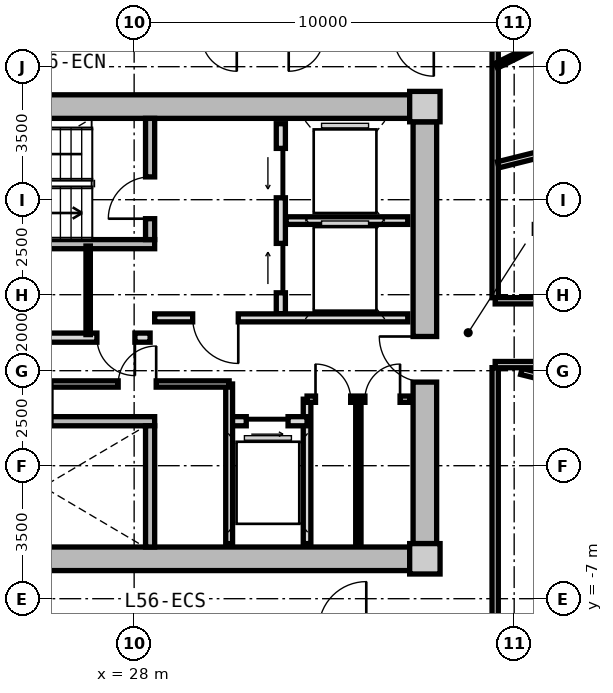
"""IFC4 building model, lengths in metres.
Left out: names, types, materials, properties, quantities, classifications, styles, units other than length and angle.
Written with IfcOpenShell. Run it as: python <this file> out.ifc"""

import sys

from ifc_helpers import new_model, si_unit, direction, frame, frame_2d, origin, origin_2d, place, context, subcontext, project, spatial, rectangle, extrude, source, transform, mapped, element, fill, save


model = new_model("IFC4")
c1 = context("Model", 3, precision=1e-05, world=origin(), true_north=direction((0.0, 1.0)))
c2 = subcontext(c1, "Body", "Model", "MODEL_VIEW")
j1 = project(units=[si_unit("LENGTHUNIT", "METRE"), si_unit("PLANEANGLEUNIT", "RADIAN")], contexts=[c1])
p1 = place(None, origin())
s1 = spatial("IfcSite", under=j1, at=p1, CompositionType="ELEMENT")
p2 = place(p1, origin())
s2 = spatial("IfcBuilding", under=s1, at=p2, CompositionType="ELEMENT")
p3 = place(p2, frame((0.0, 0.0, 180.05)))
s3 = spatial("IfcBuildingStorey", under=s2, at=p3, CompositionType="ELEMENT", Elevation=180.05)
m1 = source(origin(), c2, "Body", "SweptSolid", [
    extrude(rectangle(XDim=0.8, YDim=0.8, at=origin_2d()), origin(), (0.0, 0.0, 1.0), 3.05),
])
for number, where, z_axis, x_axis in (
    (1, (35.65, -5.95, 0.0), (0.0, 0.0, 1.0), (1.0, 0.0, 0.0)),
    (2, (35.65, 5.95, 0.0), (0.0, 0.0, 1.0), (1.0, 0.0, 0.0)),
):
    element("IfcColumn", number, at=place(p3, frame(where, z_axis=z_axis, x_axis=x_axis)), inside=s3, PredefinedType="COLUMN", context=c2, shape_type="MappedRepresentation", body=[
        mapped(m1, transform((0.0, 0.0, 0.0), x_axis=(1.0, 0.0, 0.0), y_axis=(0.0, 1.0, 0.0), z_axis=(0.0, 0.0, 1.0), scale=1.0)),
    ])
m2 = source(origin(), c2, "Body", "SweptSolid", [
    extrude(rectangle(XDim=14.5, YDim=0.62, at=frame_2d((7.25, 0.0))), origin(), (0.0, 0.0, 1.0), 2.81),
])
for number, where, z_axis, x_axis in (
    (3, (20.75, 5.95, 0.0), (0.0, 0.0, 1.0), (1.0, 0.0, 0.0)),
    (4, (35.25, -5.95, 0.0), (0.0, 0.0, 1.0), (-1.0, 0.0, 0.0)),
):
    element("IfcWall", number, at=place(p3, frame(where, z_axis=z_axis, x_axis=x_axis)), inside=s3, PredefinedType="SHEAR", context=c2, shape_type="MappedRepresentation", body=[
        mapped(m2, transform((0.0, 0.0, 0.0), x_axis=(1.0, 0.0, 0.0), y_axis=(0.0, 1.0, 0.0), z_axis=(0.0, 0.0, 1.0), scale=1.0)),
    ])
m3 = source(origin(), c2, "Body", "SweptSolid", [
    extrude(rectangle(XDim=11.1, YDim=0.62, at=frame_2d((5.55, 0.0))), origin(), (0.0, 0.0, 1.0), 2.81),
])
p4 = place(p3, frame((35.65, 5.55, 0.0), z_axis=(0.0, 0.0, 1.0), x_axis=(0.0, -1.0, 0.0)))
e5 = element("IfcWall", 5, at=p4, inside=s3, PredefinedType="SHEAR", context=c2, shape_type="MappedRepresentation", body=[
    mapped(m3, transform((0.0, 0.0, 0.0), x_axis=(1.0, 0.0, 0.0), y_axis=(0.0, 1.0, 0.0), z_axis=(0.0, 0.0, 1.0), scale=1.0)),
])
p5 = place(p4, frame((5.65, 0.0, 0.0)))
e6 = element("IfcOpeningElement", 6, at=p5, cuts=e5, PredefinedType="OPENING", context=c2, shape_type="SweptSolid", body=[
    extrude(rectangle(XDim=1.2, YDim=2.15, at=frame_2d((0.6, 1.075))), frame((0.0, 0.32, 0.0), z_axis=(0.0, -1.0, 0.0), x_axis=(1.0, 0.0, 0.0)), (0.0, 0.0, 1.0), 0.64),
])
m4 = source(origin(), c2, "Body", "SweptSolid", [
    extrude(rectangle(XDim=7.88, YDim=0.24, at=frame_2d((3.94, 0.0))), origin(), (0.0, 0.0, 1.0), 2.81),
])
p6 = place(p3, frame((20.66, 2.33, 0.0), z_axis=(0.0, 0.0, 1.0), x_axis=(1.0, 0.0, 0.0)))
e7 = element("IfcWall", 7, at=p6, inside=s3, PredefinedType="PARTITIONING", context=c2, shape_type="MappedRepresentation", body=[
    mapped(m4, transform((0.0, 0.0, 0.0), x_axis=(1.0, 0.0, 0.0), y_axis=(0.0, 1.0, 0.0), z_axis=(0.0, 0.0, 1.0), scale=1.0)),
])
m5 = source(origin(), c2, "Body", "SweptSolid", [
    extrude(rectangle(XDim=3.19, YDim=0.24, at=frame_2d((1.595, 0.0))), origin(), (0.0, 0.0, 1.0), 2.81),
])
p7 = place(p3, frame((28.42, 2.45, 0.0), z_axis=(0.0, 0.0, 1.0), x_axis=(0.0, 1.0, 0.0)))
e8 = element("IfcWall", 8, at=p7, inside=s3, PredefinedType="PARTITIONING", context=c2, shape_type="MappedRepresentation", body=[
    mapped(m5, transform((0.0, 0.0, 0.0), x_axis=(1.0, 0.0, 0.0), y_axis=(0.0, 1.0, 0.0), z_axis=(0.0, 0.0, 1.0), scale=1.0)),
])
p8 = place(p7, frame((0.55, 0.0, 0.0)))
e9 = element("IfcOpeningElement", 9, at=p8, cuts=e8, PredefinedType="OPENING", context=c2, shape_type="SweptSolid", body=[
    extrude(rectangle(XDim=1.1, YDim=2.15, at=frame_2d((0.55, 1.075))), frame((0.0, 0.13, 0.0), z_axis=(0.0, -1.0, 0.0), x_axis=(1.0, 0.0, 0.0)), (0.0, 0.0, 1.0), 0.26),
])
p9 = place(p3, frame((20.66, -2.33, 0.0), z_axis=(0.0, 0.0, 1.0), x_axis=(1.0, 0.0, 0.0)))
e10 = element("IfcWall", 10, at=p9, inside=s3, PredefinedType="PARTITIONING", context=c2, shape_type="MappedRepresentation", body=[
    mapped(m4, transform((0.0, 0.0, 0.0), x_axis=(1.0, 0.0, 0.0), y_axis=(0.0, 1.0, 0.0), z_axis=(0.0, 0.0, 1.0), scale=1.0)),
])
p10 = place(p9, frame((1.0, 0.0, 0.0)))
e11 = element("IfcOpeningElement", 11, at=p10, cuts=e10, PredefinedType="OPENING", context=c2, shape_type="SweptSolid", body=[
    extrude(rectangle(XDim=1.1, YDim=2.15, at=frame_2d((0.55, 1.075))), frame((0.0, 0.13, 0.0), z_axis=(0.0, -1.0, 0.0), x_axis=(1.0, 0.0, 0.0)), (0.0, 0.0, 1.0), 0.26),
])
p11 = place(p3, frame((28.42, -5.64, 0.0), z_axis=(0.0, 0.0, 1.0), x_axis=(0.0, 1.0, 0.0)))
e12 = element("IfcWall", 12, at=p11, inside=s3, PredefinedType="PARTITIONING", context=c2, shape_type="MappedRepresentation", body=[
    mapped(m5, transform((0.0, 0.0, 0.0), x_axis=(1.0, 0.0, 0.0), y_axis=(0.0, 1.0, 0.0), z_axis=(0.0, 0.0, 1.0), scale=1.0)),
])
m6 = source(origin(), c2, "Body", "SweptSolid", [
    extrude(rectangle(XDim=5.0, YDim=0.24, at=frame_2d((2.5, 0.0))), origin(), (0.0, 0.0, 1.0), 2.795),
])
p12 = place(p3, frame((31.86, 0.5, 0.0), z_axis=(0.0, 0.0, 1.0), x_axis=(0.0, 1.0, 0.0)))
e13 = element("IfcWall", 13, at=p12, inside=s3, PredefinedType="PARTITIONING", context=c2, shape_type="MappedRepresentation", body=[
    mapped(m6, transform((0.0, 0.0, 0.0), x_axis=(1.0, 0.0, 0.0), y_axis=(0.0, 1.0, 0.0), z_axis=(0.0, 0.0, 1.0), scale=1.0)),
])
p13 = place(p12, frame((3.05, 0.0, 0.0)))
e14 = element("IfcOpeningElement", 14, at=p13, cuts=e13, PredefinedType="OPENING", context=c2, shape_type="SweptSolid", body=[
    extrude(rectangle(XDim=1.3, YDim=2.2, at=frame_2d((0.65, 1.1))), frame((0.0, 0.13, 0.0), z_axis=(0.0, -1.0, 0.0), x_axis=(1.0, 0.0, 0.0)), (0.0, 0.0, 1.0), 0.26),
])
p14 = place(p12, frame((0.55, 0.0, 0.0)))
e15 = element("IfcOpeningElement", 15, at=p14, cuts=e13, PredefinedType="OPENING", context=c2, shape_type="SweptSolid", body=[
    extrude(rectangle(XDim=1.3, YDim=2.2, at=frame_2d((0.65, 1.1))), frame((0.0, 0.13, 0.0), z_axis=(0.0, -1.0, 0.0), x_axis=(1.0, 0.0, 0.0)), (0.0, 0.0, 1.0), 0.26),
])
m7 = source(origin(), c2, "Body", "SweptSolid", [
    extrude(rectangle(XDim=3.2, YDim=0.2, at=frame_2d((1.6, 0.0))), origin(), (0.0, 0.0, 1.0), 2.795),
])
p15 = place(p3, frame((32.0, 2.95, 0.0), z_axis=(0.0, 0.0, 1.0), x_axis=(1.0, 0.0, 0.0)))
e16 = element("IfcWall", 16, at=p15, inside=s3, PredefinedType="PARTITIONING", context=c2, shape_type="MappedRepresentation", body=[
    mapped(m7, transform((0.0, 0.0, 0.0), x_axis=(1.0, 0.0, 0.0), y_axis=(0.0, 1.0, 0.0), z_axis=(0.0, 0.0, 1.0), scale=1.0)),
])
m8 = source(origin(), c2, "Body", "SweptSolid", [
    extrude(rectangle(XDim=6.66, YDim=0.21, at=frame_2d((3.33, 0.0))), origin(), (0.0, 0.0, 1.0), 2.795),
])
p16 = place(p3, frame((28.54, 0.39, 0.0), z_axis=(0.0, 0.0, 1.0), x_axis=(1.0, 0.0, 0.0)))
e17 = element("IfcWall", 17, at=p16, inside=s3, PredefinedType="PARTITIONING", context=c2, shape_type="MappedRepresentation", body=[
    mapped(m8, transform((0.0, 0.0, 0.0), x_axis=(1.0, 0.0, 0.0), y_axis=(0.0, 1.0, 0.0), z_axis=(0.0, 0.0, 1.0), scale=1.0)),
])
p17 = place(p16, frame((1.0, 0.0, 0.0)))
e18 = element("IfcOpeningElement", 18, at=p17, cuts=e17, PredefinedType="OPENING", context=c2, shape_type="SweptSolid", body=[
    extrude(rectangle(XDim=1.2, YDim=2.15, at=frame_2d((0.6, 1.075))), frame((0.0, 0.115, 0.0), z_axis=(0.0, -1.0, 0.0), x_axis=(1.0, 0.0, 0.0)), (0.0, 0.0, 1.0), 0.23),
])
m9 = source(origin(), c2, "Body", "SweptSolid", [
    extrude(rectangle(XDim=7.62, YDim=0.24, at=frame_2d((3.81, 0.0))), origin(), (0.0, 0.0, 1.0), 2.795),
])
p18 = place(p3, frame((20.8, -0.13, 0.0), z_axis=(0.0, 0.0, 1.0), x_axis=(1.0, 0.0, 0.0)))
e19 = element("IfcWall", 19, at=p18, inside=s3, PredefinedType="PARTITIONING", context=c2, shape_type="MappedRepresentation", body=[
    mapped(m9, transform((0.0, 0.0, 0.0), x_axis=(1.0, 0.0, 0.0), y_axis=(0.0, 1.0, 0.0), z_axis=(0.0, 0.0, 1.0), scale=1.0)),
])
p19 = place(p18, frame((6.22, 0.0, 0.0)))
e20 = element("IfcOpeningElement", 20, at=p19, cuts=e19, PredefinedType="OPENING", context=c2, shape_type="SweptSolid", body=[
    extrude(rectangle(XDim=1.0, YDim=2.1, at=frame_2d((0.5, 1.05))), frame((0.0, 0.13, 0.0), z_axis=(0.0, -1.0, 0.0), x_axis=(1.0, 0.0, 0.0)), (0.0, 0.0, 1.0), 0.26),
])
p20 = place(p18, frame((2.4, 0.0, 0.0)))
e21 = element("IfcOpeningElement", 21, at=p20, cuts=e19, PredefinedType="OPENING", context=c2, shape_type="SweptSolid", body=[
    extrude(rectangle(XDim=1.0, YDim=2.1, at=frame_2d((0.5, 1.05))), frame((0.0, 0.13, 0.0), z_axis=(0.0, -1.0, 0.0), x_axis=(1.0, 0.0, 0.0)), (0.0, 0.0, 1.0), 0.26),
])
m10 = source(origin(), c2, "Body", "SweptSolid", [
    extrude(rectangle(XDim=2.33, YDim=0.115, at=frame_2d((1.165, 0.0))), origin(), (0.0, 0.0, 1.0), 2.795),
])
p21 = place(p3, frame((26.79, -0.05, 0.0), z_axis=(0.0, 0.0, 1.0), x_axis=(0.0, 1.0, 0.0)))
e22 = element("IfcWall", 22, at=p21, inside=s3, PredefinedType="PARTITIONING", context=c2, shape_type="MappedRepresentation", body=[
    mapped(m10, transform((0.0, 0.0, 0.0), x_axis=(1.0, 0.0, 0.0), y_axis=(0.0, 1.0, 0.0), z_axis=(0.0, 0.0, 1.0), scale=1.0)),
])
m11 = source(origin(), c2, "Body", "SweptSolid", [
    extrude(rectangle(XDim=3.8, YDim=0.2, at=frame_2d((1.9, 0.0))), origin(), (0.0, 0.0, 1.0), 2.795),
])
p22 = place(p3, frame((32.55, -5.55, 0.0), z_axis=(0.0, 0.0, 1.0), x_axis=(0.0, 1.0, 0.0)))
e23 = element("IfcWall", 23, at=p22, inside=s3, PredefinedType="PARTITIONING", context=c2, shape_type="MappedRepresentation", body=[
    mapped(m11, transform((0.0, 0.0, 0.0), x_axis=(1.0, 0.0, 0.0), y_axis=(0.0, 1.0, 0.0), z_axis=(0.0, 0.0, 1.0), scale=1.0)),
])
m12 = source(origin(), c2, "Body", "SweptSolid", [
    extrude(rectangle(XDim=2.05, YDim=0.24, at=frame_2d((1.025, 0.0))), origin(), (0.0, 0.0, 1.0), 2.795),
])
p23 = place(p3, frame((30.5, -2.33, 0.0), z_axis=(0.0, 0.0, 1.0), x_axis=(1.0, 0.0, 0.0)))
e24 = element("IfcWall", 24, at=p23, inside=s3, PredefinedType="PARTITIONING", context=c2, shape_type="MappedRepresentation", body=[
    mapped(m12, transform((0.0, 0.0, 0.0), x_axis=(1.0, 0.0, 0.0), y_axis=(0.0, 1.0, 0.0), z_axis=(0.0, 0.0, 1.0), scale=1.0)),
])
p24 = place(p23, frame((0.45, 0.0, 0.0)))
e25 = element("IfcOpeningElement", 25, at=p24, cuts=e24, PredefinedType="OPENING", context=c2, shape_type="SweptSolid", body=[
    extrude(rectangle(XDim=1.1, YDim=2.2, at=frame_2d((0.55, 1.1))), frame((0.0, 0.13, 0.0), z_axis=(0.0, -1.0, 0.0), x_axis=(1.0, 0.0, 0.0)), (0.0, 0.0, 1.0), 0.26),
])
m13 = source(origin(), c2, "Body", "SweptSolid", [
    extrude(rectangle(XDim=4.2, YDim=0.18, at=frame_2d((2.1, 0.0))), origin(), (0.0, 0.0, 1.0), 2.795),
])
p25 = place(p3, frame((30.5, -5.55, 0.0), z_axis=(0.0, 0.0, 1.0), x_axis=(0.0, 1.0, 0.0)))
e26 = element("IfcWall", 26, at=p25, inside=s3, PredefinedType="PARTITIONING", context=c2, shape_type="MappedRepresentation", body=[
    mapped(m13, transform((0.0, 0.0, 0.0), x_axis=(1.0, 0.0, 0.0), y_axis=(0.0, 1.0, 0.0), z_axis=(0.0, 0.0, 1.0), scale=1.0)),
])
m14 = source(origin(), c2, "Body", "SweptSolid", [
    extrude(rectangle(XDim=4.77, YDim=0.165, at=frame_2d((2.385, 0.0))), origin(), (0.0, 0.0, 1.0), 2.795),
])
p26 = place(p3, frame((25.73, -1.35, 0.0), z_axis=(0.0, 0.0, 1.0), x_axis=(1.0, 0.0, 0.0)))
e27 = element("IfcWall", 27, at=p26, inside=s3, PredefinedType="PARTITIONING", context=c2, shape_type="MappedRepresentation", body=[
    mapped(m14, transform((0.0, 0.0, 0.0), x_axis=(1.0, 0.0, 0.0), y_axis=(0.0, 1.0, 0.0), z_axis=(0.0, 0.0, 1.0), scale=1.0)),
])
p27 = place(p26, frame((1.85, 0.0, 0.0)))
e28 = element("IfcOpeningElement", 28, at=p27, cuts=e27, PredefinedType="OPENING", context=c2, shape_type="SweptSolid", body=[
    extrude(rectangle(XDim=1.0, YDim=2.1, at=frame_2d((0.5, 1.05))), frame((0.0, 0.093, 0.0), z_axis=(0.0, -1.0, 0.0), x_axis=(1.0, 0.0, 0.0)), (0.0, 0.0, 1.0), 0.185),
])
m15 = source(origin(), c2, "Body", "SweptSolid", [
    extrude(rectangle(XDim=2.7, YDim=0.165, at=frame_2d((1.35, 0.0))), origin(), (0.0, 0.0, 1.0), 2.795),
])
p28 = place(p3, frame((32.55, -1.75, 0.0), z_axis=(0.0, 0.0, 1.0), x_axis=(1.0, 0.0, 0.0)))
e29 = element("IfcWall", 29, at=p28, inside=s3, PredefinedType="PARTITIONING", context=c2, shape_type="MappedRepresentation", body=[
    mapped(m15, transform((0.0, 0.0, 0.0), x_axis=(1.0, 0.0, 0.0), y_axis=(0.0, 1.0, 0.0), z_axis=(0.0, 0.0, 1.0), scale=1.0)),
])
p29 = place(p28, frame((0.222, 0.0, 0.0)))
e30 = element("IfcOpeningElement", 30, at=p29, cuts=e29, PredefinedType="OPENING", context=c2, shape_type="SweptSolid", body=[
    extrude(rectangle(XDim=0.925, YDim=2.1, at=frame_2d((0.462, 1.05))), frame((0.0, 0.093, 0.0), z_axis=(0.0, -1.0, 0.0), x_axis=(1.0, 0.0, 0.0)), (0.0, 0.0, 1.0), 0.185),
])
p30 = place(p28, frame((1.522, 0.0, 0.0)))
e31 = element("IfcOpeningElement", 31, at=p30, cuts=e29, PredefinedType="OPENING", context=c2, shape_type="SweptSolid", body=[
    extrude(rectangle(XDim=0.925, YDim=2.1, at=frame_2d((0.462, 1.05))), frame((0.0, 0.093, 0.0), z_axis=(0.0, -1.0, 0.0), x_axis=(1.0, 0.0, 0.0)), (0.0, 0.0, 1.0), 0.185),
])
m16 = source(origin(), c2, "Body", "SweptSolid", [
    extrude(rectangle(XDim=3.8, YDim=0.14, at=frame_2d((1.9, 0.0))), origin(), (0.0, 0.0, 1.0), 2.795),
])
p31 = place(p3, frame((33.9, -5.55, 0.0), z_axis=(0.0, 0.0, 1.0), x_axis=(0.0, 1.0, 0.0)))
e32 = element("IfcWall", 32, at=p31, inside=s3, PredefinedType="PARTITIONING", context=c2, shape_type="MappedRepresentation", body=[
    mapped(m16, transform((0.0, 0.0, 0.0), x_axis=(1.0, 0.0, 0.0), y_axis=(0.0, 1.0, 0.0), z_axis=(0.0, 0.0, 1.0), scale=1.0)),
])
m17 = source(origin(), c2, "Body", "SweptSolid", [
    extrude(rectangle(XDim=6.88, YDim=0.165, at=frame_2d((3.44, 0.0))), origin(), (0.0, 0.0, 1.0), 2.795),
])
for number, where, z_axis, x_axis in (
    (33, (37.5, 7.8, 0.0), (0.0, 0.0, 1.0), (0.0, -1.0, 0.0)),
    (34, (37.5, -0.92, 0.0), (0.0, 0.0, 1.0), (0.0, -1.0, 0.0)),
):
    element("IfcWall", number, at=place(p3, frame(where, z_axis=z_axis, x_axis=x_axis)), inside=s3, PredefinedType="PARTITIONING", context=c2, shape_type="MappedRepresentation", body=[
        mapped(m17, transform((0.0, 0.0, 0.0), x_axis=(1.0, 0.0, 0.0), y_axis=(0.0, 1.0, 0.0), z_axis=(0.0, 0.0, 1.0), scale=1.0)),
    ])
m18 = source(origin(), c2, "Body", "SweptSolid", [
    extrude(rectangle(XDim=5.564, YDim=0.165, at=frame_2d((2.782, 0.0))), origin(), (0.0, 0.0, 1.0), 2.345),
])
p32 = place(p3, frame((38.19, -1.02, 0.0), z_axis=(0.0, 0.0, 1.0), x_axis=(0.97031260977, -0.241854169533, 0.0)))
e35 = element("IfcWall", 35, at=p32, inside=s3, PredefinedType="PARTITIONING", context=c2, shape_type="MappedRepresentation", body=[
    mapped(m18, transform((0.0, 0.0, 0.0), x_axis=(1.0, 0.0, 0.0), y_axis=(0.0, 1.0, 0.0), z_axis=(0.0, 0.0, 1.0), scale=1.0)),
])
m19 = source(origin(), c2, "Body", "SweptSolid", [
    extrude(rectangle(XDim=6.193, YDim=0.165, at=frame_2d((3.096, 0.0))), origin(), (0.0, 0.0, 1.0), 2.345),
])
p33 = place(p3, frame((37.58, 4.419, 0.0), z_axis=(0.0, 0.0, 1.0), x_axis=(0.970309243466, 0.241867674657, 0.0)))
e36 = element("IfcWall", 36, at=p33, inside=s3, PredefinedType="PARTITIONING", context=c2, shape_type="MappedRepresentation", body=[
    mapped(m19, transform((0.0, 0.0, 0.0), x_axis=(1.0, 0.0, 0.0), y_axis=(0.0, 1.0, 0.0), z_axis=(0.0, 0.0, 1.0), scale=1.0)),
])
m20 = source(origin(), c2, "Body", "SweptSolid", [
    extrude(rectangle(XDim=6.139, YDim=0.165, at=frame_2d((3.069, 0.0))), origin(), (0.0, 0.0, 1.0), 2.795),
])
p34 = place(p3, frame((37.5, 0.84, 0.0), z_axis=(0.0, 0.0, 1.0), x_axis=(1.0, 0.0, 0.0)))
e37 = element("IfcWall", 37, at=p34, inside=s3, PredefinedType="PARTITIONING", context=c2, shape_type="MappedRepresentation", body=[
    mapped(m20, transform((0.0, 0.0, 0.0), x_axis=(1.0, 0.0, 0.0), y_axis=(0.0, 1.0, 0.0), z_axis=(0.0, 0.0, 1.0), scale=1.0)),
])
p35 = place(p34, frame((2.594, 0.0, 0.0)))
e38 = element("IfcOpeningElement", 38, at=p35, cuts=e37, PredefinedType="OPENING", context=c2, shape_type="SweptSolid", body=[
    extrude(rectangle(XDim=0.95, YDim=2.1, at=frame_2d((0.475, 1.05))), frame((0.0, 0.093, 0.0), z_axis=(0.0, -1.0, 0.0), x_axis=(1.0, 0.0, 0.0)), (0.0, 0.0, 1.0), 0.185),
])
p36 = place(p3, frame((43.639, -0.84, 0.0), z_axis=(0.0, 0.0, 1.0), x_axis=(-1.0, 0.0, 0.0)))
e39 = element("IfcWall", 39, at=p36, inside=s3, PredefinedType="PARTITIONING", context=c2, shape_type="MappedRepresentation", body=[
    mapped(m20, transform((0.0, 0.0, 0.0), x_axis=(1.0, 0.0, 0.0), y_axis=(0.0, 1.0, 0.0), z_axis=(0.0, 0.0, 1.0), scale=1.0)),
])
m21 = source(origin(), c2, "Body", "SweptSolid", [
    extrude(rectangle(XDim=2.471, YDim=0.14, at=frame_2d((1.235, 0.0))), origin(), (0.0, 0.0, 1.0), 2.795),
])
p37 = place(p3, frame((37.53, 7.026, 0.0), z_axis=(0.0, 0.0, 1.0), x_axis=(0.895295102372, 0.445473545419, 0.0)))
e40 = element("IfcWall", 40, at=p37, inside=s3, PredefinedType="PARTITIONING", context=c2, shape_type="MappedRepresentation", body=[
    mapped(m21, transform((0.0, 0.0, 0.0), x_axis=(1.0, 0.0, 0.0), y_axis=(0.0, 1.0, 0.0), z_axis=(0.0, 0.0, 1.0), scale=1.0)),
])
m22 = source(origin(), c2, "Body", "SweptSolid", [
    extrude(rectangle(XDim=1.1, YDim=2.15, at=frame_2d((0.55, 1.075))), frame((0.0, 0.025, 0.0), z_axis=(0.0, -1.0, 0.0), x_axis=(1.0, 0.0, 0.0)), (0.0, 0.0, 1.0), 0.05),
])
p38 = place(p8, origin())
e41 = element("IfcDoor", 41, at=p38, inside=s3, OperationType="SINGLE_SWING_LEFT", PredefinedType="DOOR", context=c2, shape_type="MappedRepresentation", body=[
    mapped(m22, transform((0.0, 0.0, 0.0), x_axis=(1.0, 0.0, 0.0), y_axis=(0.0, 1.0, 0.0), z_axis=(0.0, 0.0, 1.0), scale=1.0)),
])
fill(e9, e41)
m23 = source(origin(), c2, "Body", "SweptSolid", [
    extrude(rectangle(XDim=1.3, YDim=2.2, at=frame_2d((0.65, 1.1))), frame((0.0, 0.025, 0.0), z_axis=(0.0, -1.0, 0.0), x_axis=(1.0, 0.0, 0.0)), (0.0, 0.0, 1.0), 0.05),
])
p39 = place(p13, origin())
e42 = element("IfcDoor", 42, at=p39, inside=s3, OperationType="SLIDING_TO_LEFT", PredefinedType="DOOR", context=c2, shape_type="MappedRepresentation", body=[
    mapped(m23, transform((0.0, 0.0, 0.0), x_axis=(1.0, 0.0, 0.0), y_axis=(0.0, 1.0, 0.0), z_axis=(0.0, 0.0, 1.0), scale=1.0)),
])
fill(e14, e42)
p40 = place(p14, origin())
e43 = element("IfcDoor", 43, at=p40, inside=s3, OperationType="SLIDING_TO_RIGHT", PredefinedType="DOOR", context=c2, shape_type="MappedRepresentation", body=[
    mapped(m23, transform((0.0, 0.0, 0.0), x_axis=(1.0, 0.0, 0.0), y_axis=(0.0, 1.0, 0.0), z_axis=(0.0, 0.0, 1.0), scale=1.0)),
])
fill(e15, e43)
m24 = source(origin(), c2, "Body", "SweptSolid", [
    extrude(rectangle(XDim=1.2, YDim=2.15, at=frame_2d((0.6, 1.075))), frame((0.0, 0.025, 0.0), z_axis=(0.0, -1.0, 0.0), x_axis=(1.0, 0.0, 0.0)), (0.0, 0.0, 1.0), 0.05),
])
p41 = place(p17, frame((1.2, 0.0, 0.0), z_axis=(0.0, 0.0, 1.0), x_axis=(-1.0, 0.0, 0.0)))
e44 = element("IfcDoor", 44, at=p41, inside=s3, OperationType="SINGLE_SWING_LEFT", PredefinedType="DOOR", context=c2, shape_type="MappedRepresentation", body=[
    mapped(m24, transform((0.0, 0.0, 0.0), x_axis=(1.0, 0.0, 0.0), y_axis=(0.0, 1.0, 0.0), z_axis=(0.0, 0.0, 1.0), scale=1.0)),
])
fill(e18, e44)
p42 = place(p5, frame((1.2, 0.0, 0.0), z_axis=(0.0, 0.0, 1.0), x_axis=(-1.0, 0.0, 0.0)))
e45 = element("IfcDoor", 45, at=p42, inside=s3, OperationType="SINGLE_SWING_RIGHT", PredefinedType="DOOR", context=c2, shape_type="MappedRepresentation", body=[
    mapped(m24, transform((0.0, 0.0, 0.0), x_axis=(1.0, 0.0, 0.0), y_axis=(0.0, 1.0, 0.0), z_axis=(0.0, 0.0, 1.0), scale=1.0)),
])
fill(e6, e45)
m25 = source(origin(), c2, "Body", "SweptSolid", [
    extrude(rectangle(XDim=1.0, YDim=2.1, at=frame_2d((0.5, 1.05))), frame((0.0, 0.025, 0.0), z_axis=(0.0, -1.0, 0.0), x_axis=(1.0, 0.0, 0.0)), (0.0, 0.0, 1.0), 0.05),
])
p43 = place(p19, frame((1.0, 0.0, 0.0), z_axis=(0.0, 0.0, 1.0), x_axis=(-1.0, 0.0, 0.0)))
e46 = element("IfcDoor", 46, at=p43, inside=s3, OperationType="SINGLE_SWING_LEFT", PredefinedType="DOOR", context=c2, shape_type="MappedRepresentation", body=[
    mapped(m25, transform((0.0, 0.0, 0.0), x_axis=(1.0, 0.0, 0.0), y_axis=(0.0, 1.0, 0.0), z_axis=(0.0, 0.0, 1.0), scale=1.0)),
])
fill(e20, e46)
m26 = source(origin(), c2, "Body", "SweptSolid", [
    extrude(rectangle(XDim=1.1, YDim=2.2, at=frame_2d((0.55, 1.1))), frame((0.0, 0.025, 0.0), z_axis=(0.0, -1.0, 0.0), x_axis=(1.0, 0.0, 0.0)), (0.0, 0.0, 1.0), 0.05),
])
p44 = place(p24, frame((1.1, 0.0, 0.0), z_axis=(0.0, 0.0, 1.0), x_axis=(-1.0, 0.0, 0.0)))
e47 = element("IfcDoor", 47, at=p44, inside=s3, OperationType="SLIDING_TO_RIGHT", PredefinedType="DOOR", context=c2, shape_type="MappedRepresentation", body=[
    mapped(m26, transform((0.0, 0.0, 0.0), x_axis=(1.0, 0.0, 0.0), y_axis=(0.0, 1.0, 0.0), z_axis=(0.0, 0.0, 1.0), scale=1.0)),
])
fill(e25, e47)
p45 = place(p27, origin())
e48 = element("IfcDoor", 48, at=p45, inside=s3, OperationType="SINGLE_SWING_RIGHT", PredefinedType="DOOR", context=c2, shape_type="MappedRepresentation", body=[
    mapped(m25, transform((0.0, 0.0, 0.0), x_axis=(1.0, 0.0, 0.0), y_axis=(0.0, 1.0, 0.0), z_axis=(0.0, 0.0, 1.0), scale=1.0)),
])
fill(e28, e48)
m27 = source(origin(), c2, "Body", "SweptSolid", [
    extrude(rectangle(XDim=0.925, YDim=2.1, at=frame_2d((0.462, 1.05))), frame((0.0, 0.025, 0.0), z_axis=(0.0, -1.0, 0.0), x_axis=(1.0, 0.0, 0.0)), (0.0, 0.0, 1.0), 0.05),
])
p46 = place(p29, origin())
e49 = element("IfcDoor", 49, at=p46, inside=s3, OperationType="SINGLE_SWING_LEFT", PredefinedType="DOOR", context=c2, shape_type="MappedRepresentation", body=[
    mapped(m27, transform((0.0, 0.0, 0.0), x_axis=(1.0, 0.0, 0.0), y_axis=(0.0, 1.0, 0.0), z_axis=(0.0, 0.0, 1.0), scale=1.0)),
])
fill(e30, e49)
p47 = place(p30, origin())
e50 = element("IfcDoor", 50, at=p47, inside=s3, OperationType="SINGLE_SWING_RIGHT", PredefinedType="DOOR", context=c2, shape_type="MappedRepresentation", body=[
    mapped(m27, transform((0.0, 0.0, 0.0), x_axis=(1.0, 0.0, 0.0), y_axis=(0.0, 1.0, 0.0), z_axis=(0.0, 0.0, 1.0), scale=1.0)),
])
fill(e31, e50)
save(model, sys.argv[1])
